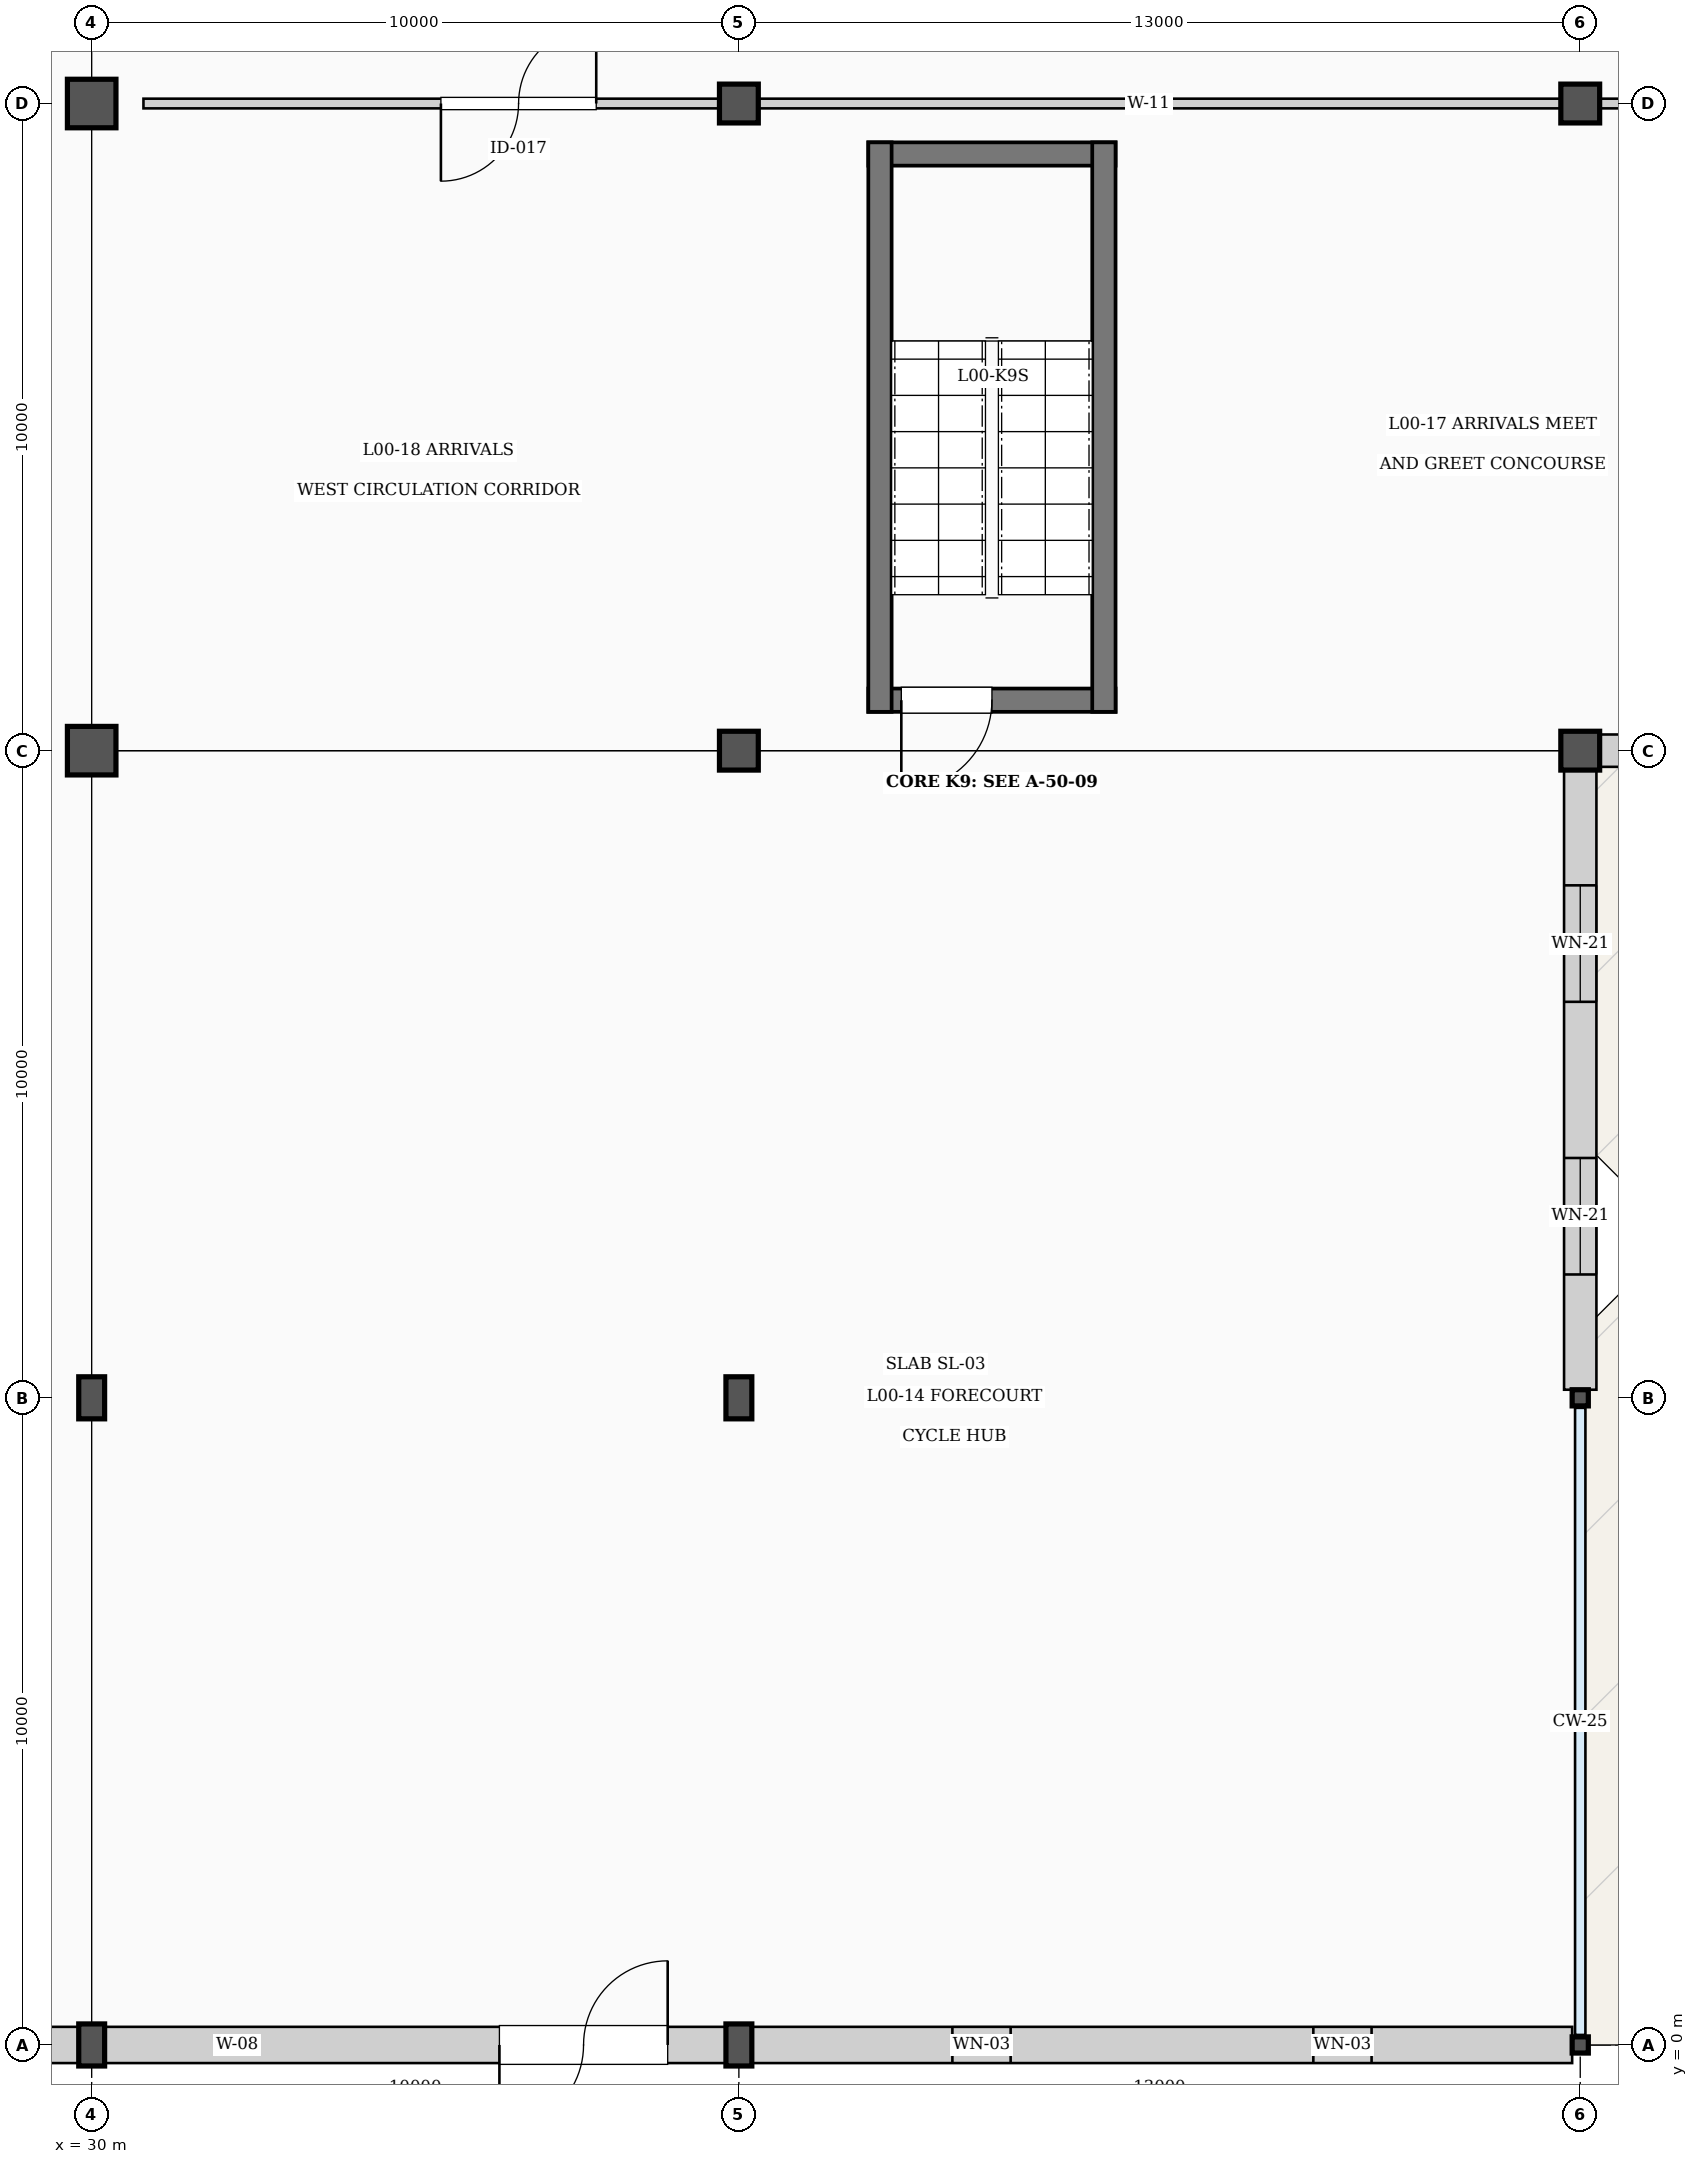
"""IFC4 building model, lengths in metres.
Left out: names, types, materials, properties, quantities, classifications, styles, units other than length and angle.
Written with IfcOpenShell. Run it as: python <this file> out.ifc"""

import sys

from ifc_helpers import new_model, si_unit, direction, frame, frame_2d, origin, origin_2d, place, context, subcontext, project, spatial, rectangle, hollow_rectangle, extrude, element, fill, save


model = new_model("IFC4")
c1 = context("Model", 3, precision=1e-05, world=origin(), true_north=direction((0.0, 1.0)))
c2 = subcontext(c1, "Body", "Model", "MODEL_VIEW")
j1 = project(units=[si_unit("LENGTHUNIT", "METRE"), si_unit("PLANEANGLEUNIT", "RADIAN")], contexts=[c1])
p1 = place(None, origin())
s1 = spatial("IfcSite", under=j1, at=p1, CompositionType="ELEMENT")
p2 = place(p1, origin())
s2 = spatial("IfcBuilding", under=s1, at=p2, CompositionType="ELEMENT")
p3 = place(p2, origin())
s3 = spatial("IfcBuildingStorey", under=s2, at=p3, CompositionType="ELEMENT", Elevation=0.0)
for number, where, z_axis, x_axis in (
    (1, (30.0, 0.0, 0.0), (0.0, 0.0, 1.0), (1.0, 0.0, 0.0)),
    (2, (30.0, 10.0, 0.0), (0.0, 0.0, 1.0), (1.0, 0.0, 0.0)),
):
    element("IfcColumn", number, at=place(p3, frame(where, z_axis=z_axis, x_axis=x_axis)), inside=s3, PredefinedType="COLUMN", context=c2, shape_type="SweptSolid", body=[
        extrude(rectangle(XDim=0.4, YDim=0.65, at=origin_2d()), origin(), (0.0, 0.0, 1.0), 5.4),
    ])
for number, where, z_axis, x_axis in (
    (3, (30.0, 20.0, 0.0), (0.0, 0.0, 1.0), (1.0, 0.0, 0.0)),
    (4, (30.0, 30.0, 0.0), (0.0, 0.0, 1.0), (1.0, 0.0, 0.0)),
):
    element("IfcColumn", number, at=place(p3, frame(where, z_axis=z_axis, x_axis=x_axis)), inside=s3, PredefinedType="COLUMN", context=c2, shape_type="SweptSolid", body=[
        extrude(rectangle(XDim=0.75, YDim=0.75, at=origin_2d()), origin(), (0.0, 0.0, 1.0), 5.4),
    ])
for number, where, z_axis, x_axis in (
    (5, (40.0, 0.0, 0.0), (0.0, 0.0, 1.0), (1.0, 0.0, 0.0)),
    (6, (40.0, 10.0, 0.0), (0.0, 0.0, 1.0), (1.0, 0.0, 0.0)),
):
    element("IfcColumn", number, at=place(p3, frame(where, z_axis=z_axis, x_axis=x_axis)), inside=s3, PredefinedType="COLUMN", context=c2, shape_type="SweptSolid", body=[
        extrude(rectangle(XDim=0.4, YDim=0.65, at=origin_2d()), origin(), (0.0, 0.0, 1.0), 5.4),
    ])
for number, where, z_axis, x_axis in (
    (7, (40.0, 20.0, 0.0), (0.0, 0.0, 1.0), (1.0, 0.0, 0.0)),
    (8, (40.0, 30.0, 0.0), (0.0, 0.0, 1.0), (1.0, 0.0, 0.0)),
):
    element("IfcColumn", number, at=place(p3, frame(where, z_axis=z_axis, x_axis=x_axis)), inside=s3, PredefinedType="COLUMN", context=c2, shape_type="SweptSolid", body=[
        extrude(rectangle(XDim=0.6, YDim=0.6, at=origin_2d()), origin(), (0.0, 0.0, 1.0), 5.4),
    ])
for number, where, z_axis, x_axis in (
    (9, (53.0, 0.0, 0.0), (0.0, 0.0, 1.0), (1.0, 0.0, 0.0)),
    (10, (53.0, 10.0, 0.0), (0.0, 0.0, 1.0), (1.0, 0.0, 0.0)),
):
    element("IfcColumn", number, at=place(p3, frame(where, z_axis=z_axis, x_axis=x_axis)), inside=s3, PredefinedType="COLUMN", context=c2, shape_type="SweptSolid", body=[
        extrude(hollow_rectangle(XDim=0.25, YDim=0.25, WallThickness=0.012, InnerFilletRadius=0.012, OuterFilletRadius=0.019, at=origin_2d()), origin(), (0.0, 0.0, 1.0), 5.4),
    ])
for number, where, z_axis, x_axis in (
    (11, (53.0, 20.0, 0.0), (0.0, 0.0, 1.0), (1.0, 0.0, 0.0)),
    (12, (53.0, 30.0, 0.0), (0.0, 0.0, 1.0), (1.0, 0.0, 0.0)),
):
    element("IfcColumn", number, at=place(p3, frame(where, z_axis=z_axis, x_axis=x_axis)), inside=s3, PredefinedType="COLUMN", context=c2, shape_type="SweptSolid", body=[
        extrude(rectangle(XDim=0.6, YDim=0.6, at=origin_2d()), origin(), (0.0, 0.0, 1.0), 5.4),
    ])
p4 = place(p3, frame((20.2, 0.0, 0.0), z_axis=(0.0, 0.0, 1.0), x_axis=(1.0, 0.0, 0.0)))
e13 = element("IfcWall", 13, at=p4, inside=s3, PredefinedType="SOLIDWALL", context=c2, shape_type="SweptSolid", body=[
    extrude(rectangle(XDim=9.6, YDim=0.56, at=frame_2d((4.8, 0.0))), origin(), (0.0, 0.0, 1.0), 4.58),
])
p5 = place(p4, frame((3.5, 0.0, 0.0)))
e14 = element("IfcOpeningElement", 14, at=p5, cuts=e13, PredefinedType="OPENING", context=c2, shape_type="SweptSolid", body=[
    extrude(rectangle(XDim=2.6, YDim=2.6, at=frame_2d((1.3, 1.3))), frame((0.0, 0.29, 0.0), z_axis=(0.0, -1.0, 0.0), x_axis=(1.0, 0.0, 0.0)), (0.0, 0.0, 1.0), 0.58),
])
p6 = place(p3, frame((30.2, 0.0, 0.0), z_axis=(0.0, 0.0, 1.0), x_axis=(1.0, 0.0, 0.0)))
e15 = element("IfcWall", 15, at=p6, inside=s3, PredefinedType="SOLIDWALL", context=c2, shape_type="SweptSolid", body=[
    extrude(rectangle(XDim=9.6, YDim=0.56, at=frame_2d((4.8, 0.0))), origin(), (0.0, 0.0, 1.0), 4.58),
])
p7 = place(p6, frame((6.1, 0.0, 0.0)))
e16 = element("IfcOpeningElement", 16, at=p7, cuts=e15, PredefinedType="OPENING", context=c2, shape_type="SweptSolid", body=[
    extrude(rectangle(XDim=2.6, YDim=2.6, at=frame_2d((1.3, 1.3))), frame((0.0, 0.29, 0.0), z_axis=(0.0, -1.0, 0.0), x_axis=(1.0, 0.0, 0.0)), (0.0, 0.0, 1.0), 0.58),
])
p8 = place(p3, frame((40.2, 0.0, 0.0), z_axis=(0.0, 0.0, 1.0), x_axis=(1.0, 0.0, 0.0)))
e17 = element("IfcWall", 17, at=p8, inside=s3, PredefinedType="SOLIDWALL", context=c2, shape_type="SweptSolid", body=[
    extrude(rectangle(XDim=12.675, YDim=0.56, at=frame_2d((6.337, 0.0))), origin(), (0.0, 0.0, 1.0), 4.58),
])
p9 = place(p8, frame((3.099, 0.0, 0.9)))
e18 = element("IfcOpeningElement", 18, at=p9, cuts=e17, PredefinedType="OPENING", context=c2, shape_type="SweptSolid", body=[
    extrude(rectangle(XDim=0.9, YDim=2.1, at=frame_2d((0.45, 1.05))), frame((0.0, 0.29, 0.0), z_axis=(0.0, -1.0, 0.0), x_axis=(1.0, 0.0, 0.0)), (0.0, 0.0, 1.0), 0.58),
])
p10 = place(p8, frame((8.676, 0.0, 0.9)))
e19 = element("IfcOpeningElement", 19, at=p10, cuts=e17, PredefinedType="OPENING", context=c2, shape_type="SweptSolid", body=[
    extrude(rectangle(XDim=0.9, YDim=2.1, at=frame_2d((0.45, 1.05))), frame((0.0, 0.29, 0.0), z_axis=(0.0, -1.0, 0.0), x_axis=(1.0, 0.0, 0.0)), (0.0, 0.0, 1.0), 0.58),
])
p11 = place(p3, frame((53.3, 20.0, 0.0), z_axis=(0.0, 0.0, 1.0), x_axis=(1.0, 0.0, 0.0)))
e20 = element("IfcWall", 20, at=p11, inside=s3, PredefinedType="SOLIDWALL", context=c2, shape_type="SweptSolid", body=[
    extrude(rectangle(XDim=9.575, YDim=0.5, at=frame_2d((4.788, 0.0))), origin(), (0.0, 0.0, 1.0), 4.54),
])
p12 = place(p11, frame((3.488, 0.0, 0.0)))
e21 = element("IfcOpeningElement", 21, at=p12, cuts=e20, PredefinedType="OPENING", context=c2, shape_type="SweptSolid", body=[
    extrude(rectangle(XDim=2.6, YDim=2.6, at=frame_2d((1.3, 1.3))), frame((0.0, 0.26, 0.0), z_axis=(0.0, -1.0, 0.0), x_axis=(1.0, 0.0, 0.0)), (0.0, 0.0, 1.0), 0.52),
])
p13 = place(p3, frame((53.0, 19.7, 0.0), z_axis=(0.0, 0.0, 1.0), x_axis=(0.0, -1.0, 0.0)))
e22 = element("IfcWall", 22, at=p13, inside=s3, PredefinedType="SOLIDWALL", context=c2, shape_type="SweptSolid", body=[
    extrude(rectangle(XDim=9.575, YDim=0.5, at=frame_2d((4.788, 0.0))), origin(), (0.0, 0.0, 1.0), 4.53),
])
p14 = place(p13, frame((1.781, 0.0, 0.9)))
e23 = element("IfcOpeningElement", 23, at=p14, cuts=e22, PredefinedType="OPENING", context=c2, shape_type="SweptSolid", body=[
    extrude(rectangle(XDim=1.8, YDim=2.7, at=frame_2d((0.9, 1.35))), frame((0.0, 0.26, 0.0), z_axis=(0.0, -1.0, 0.0), x_axis=(1.0, 0.0, 0.0)), (0.0, 0.0, 1.0), 0.52),
])
p15 = place(p13, frame((5.994, 0.0, 0.9)))
e24 = element("IfcOpeningElement", 24, at=p15, cuts=e22, PredefinedType="OPENING", context=c2, shape_type="SweptSolid", body=[
    extrude(rectangle(XDim=1.8, YDim=2.7, at=frame_2d((0.9, 1.35))), frame((0.0, 0.26, 0.0), z_axis=(0.0, -1.0, 0.0), x_axis=(1.0, 0.0, 0.0)), (0.0, 0.0, 1.0), 0.52),
])
p16 = place(p3, frame((42.0, 20.78, 0.0), z_axis=(0.0, 0.0, 1.0), x_axis=(1.0, 0.0, 0.0)))
e25 = element("IfcWall", 25, at=p16, inside=s3, PredefinedType="SHEAR", context=c2, shape_type="SweptSolid", body=[
    extrude(rectangle(XDim=3.82, YDim=0.36, at=frame_2d((1.91, 0.0))), origin(), (0.0, 0.0, 1.0), 5.4),
])
p17 = place(p16, frame((0.51, 0.0, 0.0)))
e26 = element("IfcOpeningElement", 26, at=p17, cuts=e25, PredefinedType="OPENING", context=c2, shape_type="SweptSolid", body=[
    extrude(rectangle(XDim=1.4, YDim=2.35, at=frame_2d((0.7, 1.175))), frame((0.0, 0.19, 0.0), z_axis=(0.0, -1.0, 0.0), x_axis=(1.0, 0.0, 0.0)), (0.0, 0.0, 1.0), 0.38),
])
p18 = place(p3, frame((42.0, 29.22, 0.0), z_axis=(0.0, 0.0, 1.0), x_axis=(1.0, 0.0, 0.0)))
e27 = element("IfcWall", 27, at=p18, inside=s3, PredefinedType="SHEAR", context=c2, shape_type="SweptSolid", body=[
    extrude(rectangle(XDim=3.82, YDim=0.36, at=frame_2d((1.91, 0.0))), origin(), (0.0, 0.0, 1.0), 5.4),
])
for number, where, z_axis, x_axis in (
    (28, (42.18, 20.6, 0.0), (0.0, 0.0, 1.0), (0.0, 1.0, 0.0)),
    (29, (45.64, 20.6, 0.0), (0.0, 0.0, 1.0), (0.0, 1.0, 0.0)),
):
    element("IfcWall", number, at=place(p3, frame(where, z_axis=z_axis, x_axis=x_axis)), inside=s3, PredefinedType="SHEAR", context=c2, shape_type="SweptSolid", body=[
        extrude(rectangle(XDim=8.8, YDim=0.36, at=frame_2d((4.4, 0.0))), origin(), (0.0, 0.0, 1.0), 5.4),
    ])
p19 = place(p3, frame((30.8, 30.0, 0.0), z_axis=(0.0, 0.0, 1.0), x_axis=(1.0, 0.0, 0.0)))
e30 = element("IfcWall", 30, at=p19, inside=s3, PredefinedType="PARTITIONING", context=c2, shape_type="SweptSolid", body=[
    extrude(rectangle(XDim=41.4, YDim=0.15, at=frame_2d((20.7, 0.0))), origin(), (0.0, 0.0, 1.0), 4.59),
])
p20 = place(p19, frame((4.596, 0.0, 0.0)))
e31 = element("IfcOpeningElement", 31, at=p20, cuts=e30, PredefinedType="OPENING", context=c2, shape_type="SweptSolid", body=[
    extrude(rectangle(XDim=2.4, YDim=2.6, at=frame_2d((1.2, 1.3))), frame((0.0, 0.085, 0.0), z_axis=(0.0, -1.0, 0.0), x_axis=(1.0, 0.0, 0.0)), (0.0, 0.0, 1.0), 0.17),
])
p21 = place(p19, frame((24.268, 0.0, 0.0)))
e32 = element("IfcOpeningElement", 32, at=p21, cuts=e30, PredefinedType="OPENING", context=c2, shape_type="SweptSolid", body=[
    extrude(rectangle(XDim=2.8, YDim=2.7, at=frame_2d((1.4, 1.35))), frame((0.0, 0.085, 0.0), z_axis=(0.0, -1.0, 0.0), x_axis=(1.0, 0.0, 0.0)), (0.0, 0.0, 1.0), 0.17),
])
p22 = place(p7, origin())
e33 = element("IfcDoor", 33, at=p22, inside=s3, OperationType="DOUBLE_DOOR_SINGLE_SWING", PredefinedType="DOOR", context=c2, shape_type="SweptSolid", body=[
    extrude(rectangle(XDim=2.6, YDim=2.6, at=frame_2d((1.3, 1.3))), frame((0.0, 0.025, 0.0), z_axis=(0.0, -1.0, 0.0), x_axis=(1.0, 0.0, 0.0)), (0.0, 0.0, 1.0), 0.05),
])
fill(e16, e33)
p23 = place(p9, origin())
e34 = element("IfcWindow", 34, at=p23, inside=s3, PartitioningType="SINGLE_PANEL", PredefinedType="WINDOW", context=c2, shape_type="SweptSolid", body=[
    extrude(rectangle(XDim=0.9, YDim=2.1, at=frame_2d((0.45, 1.05))), frame((0.0, 0.03, 0.0), z_axis=(0.0, -1.0, 0.0), x_axis=(1.0, 0.0, 0.0)), (0.0, 0.0, 1.0), 0.06),
])
fill(e18, e34)
p24 = place(p10, origin())
e35 = element("IfcWindow", 35, at=p24, inside=s3, PartitioningType="SINGLE_PANEL", PredefinedType="WINDOW", context=c2, shape_type="SweptSolid", body=[
    extrude(rectangle(XDim=0.9, YDim=2.1, at=frame_2d((0.45, 1.05))), frame((0.0, 0.03, 0.0), z_axis=(0.0, -1.0, 0.0), x_axis=(1.0, 0.0, 0.0)), (0.0, 0.0, 1.0), 0.06),
])
fill(e19, e35)
p25 = place(p14, origin())
e36 = element("IfcWindow", 36, at=p25, inside=s3, PartitioningType="SINGLE_PANEL", PredefinedType="WINDOW", context=c2, shape_type="SweptSolid", body=[
    extrude(rectangle(XDim=1.8, YDim=2.7, at=frame_2d((0.9, 1.35))), frame((0.0, 0.03, 0.0), z_axis=(0.0, -1.0, 0.0), x_axis=(1.0, 0.0, 0.0)), (0.0, 0.0, 1.0), 0.06),
])
fill(e23, e36)
p26 = place(p15, origin())
e37 = element("IfcWindow", 37, at=p26, inside=s3, PartitioningType="SINGLE_PANEL", PredefinedType="WINDOW", context=c2, shape_type="SweptSolid", body=[
    extrude(rectangle(XDim=1.8, YDim=2.7, at=frame_2d((0.9, 1.35))), frame((0.0, 0.03, 0.0), z_axis=(0.0, -1.0, 0.0), x_axis=(1.0, 0.0, 0.0)), (0.0, 0.0, 1.0), 0.06),
])
fill(e24, e37)
p27 = place(p17, origin())
e38 = element("IfcDoor", 38, at=p27, inside=s3, OperationType="SINGLE_SWING_LEFT", PredefinedType="DOOR", context=c2, shape_type="SweptSolid", body=[
    extrude(rectangle(XDim=1.4, YDim=2.35, at=frame_2d((0.7, 1.175))), frame((0.0, 0.025, 0.0), z_axis=(0.0, -1.0, 0.0), x_axis=(1.0, 0.0, 0.0)), (0.0, 0.0, 1.0), 0.05),
])
fill(e26, e38)
p28 = place(p20, origin())
e39 = element("IfcDoor", 39, at=p28, inside=s3, OperationType="DOUBLE_DOOR_SINGLE_SWING", PredefinedType="DOOR", context=c2, shape_type="SweptSolid", body=[
    extrude(rectangle(XDim=2.4, YDim=2.6, at=frame_2d((1.2, 1.3))), frame((0.0, 0.025, 0.0), z_axis=(0.0, -1.0, 0.0), x_axis=(1.0, 0.0, 0.0)), (0.0, 0.0, 1.0), 0.05),
])
fill(e31, e39)
save(model, sys.argv[1])
